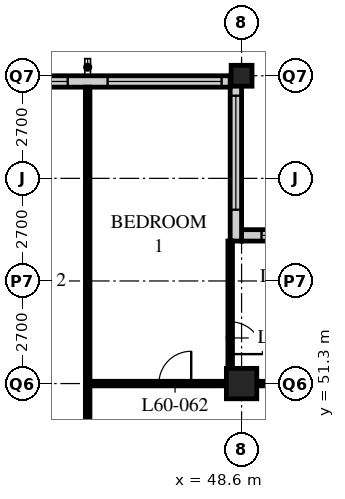
"""IFC4 building model, lengths in metres.
Left out: names, types, materials, properties, quantities, classifications, styles, units other than length and angle.
Written with IfcOpenShell. Run it as: python <this file> out.ifc"""

import sys

from ifc_helpers import new_model, si_unit, direction, frame, frame_2d, origin, origin_2d, place, context, subcontext, project, spatial, rectangle, hollow_rectangle, extrude, element, fill, save


model = new_model("IFC4")
c1 = context("Model", 3, precision=1e-05, world=origin(), true_north=direction((0.0, 1.0)))
c2 = subcontext(c1, "Body", "Model", "MODEL_VIEW")
j1 = project(units=[si_unit("LENGTHUNIT", "METRE"), si_unit("PLANEANGLEUNIT", "RADIAN")], contexts=[c1])
p1 = place(None, origin())
s1 = spatial("IfcSite", under=j1, at=p1, CompositionType="ELEMENT")
p2 = place(p1, origin())
s2 = spatial("IfcBuilding", under=s1, at=p2, CompositionType="ELEMENT")
p3 = place(p2, frame((0.0, 0.0, 231.6)))
s3 = spatial("IfcBuildingStorey", under=s2, at=p3, CompositionType="ELEMENT", Elevation=231.6)
p4 = place(p3, frame((48.6, 51.3, 0.0), z_axis=(0.0, 0.0, 1.0), x_axis=(1.0, 0.0, 0.0)))
e1 = element("IfcColumn", 1, at=p4, inside=s3, PredefinedType="COLUMN", context=c2, shape_type="SweptSolid", body=[
    extrude(hollow_rectangle(XDim=0.8, YDim=0.8, WallThickness=0.08, at=origin_2d()), origin(), (0.0, 0.0, 1.0), 3.6),
])
p5 = place(p3, frame((48.6, 59.4, 0.0), z_axis=(0.0, 0.0, 1.0), x_axis=(1.0, 0.0, 0.0)))
e2 = element("IfcColumn", 2, at=p5, inside=s3, PredefinedType="COLUMN", context=c2, shape_type="SweptSolid", body=[
    extrude(hollow_rectangle(XDim=0.55, YDim=0.55, WallThickness=0.045, at=origin_2d()), origin(), (0.0, 0.0, 1.0), 3.6),
])
p6 = place(p3, frame((52.35, 55.2, 0.0), z_axis=(0.0, 0.0, 1.0), x_axis=(-1.0, 0.0, 0.0)))
e3 = element("IfcWall", 3, at=p6, inside=s3, PredefinedType="SOLIDWALL", context=c2, shape_type="SweptSolid", body=[
    extrude(rectangle(XDim=3.75, YDim=0.3, at=frame_2d((1.875, 0.0))), origin(), (0.0, 0.0, 1.0), 2.65),
])
p7 = place(p6, frame((0.225, 0.0, 0.6)))
e4 = element("IfcOpeningElement", 4, at=p7, cuts=e3, PredefinedType="OPENING", context=c2, shape_type="SweptSolid", body=[
    extrude(rectangle(XDim=3.0, YDim=1.7, at=frame_2d((1.5, 0.85))), frame((0.0, 0.16, 0.0), z_axis=(0.0, -1.0, 0.0), x_axis=(1.0, 0.0, 0.0)), (0.0, 0.0, 1.0), 0.32),
])
p8 = place(p3, frame((48.45, 55.05, 0.0), z_axis=(0.0, 0.0, 1.0), x_axis=(0.0, 1.0, 0.0)))
e5 = element("IfcWall", 5, at=p8, inside=s3, PredefinedType="SOLIDWALL", context=c2, shape_type="SweptSolid", body=[
    extrude(rectangle(XDim=4.35, YDim=0.3, at=frame_2d((2.175, 0.0))), origin(), (0.0, 0.0, 1.0), 2.35),
])
p9 = place(p8, frame((0.825, 0.0, 0.6)))
e6 = element("IfcOpeningElement", 6, at=p9, cuts=e5, PredefinedType="OPENING", context=c2, shape_type="SweptSolid", body=[
    extrude(rectangle(XDim=3.0, YDim=1.7, at=frame_2d((1.5, 0.85))), frame((0.0, 0.16, 0.0), z_axis=(0.0, -1.0, 0.0), x_axis=(1.0, 0.0, 0.0)), (0.0, 0.0, 1.0), 0.32),
])
p10 = place(p3, frame((48.3, 59.25, 0.0), z_axis=(0.0, 0.0, 1.0), x_axis=(-1.0, 0.0, 0.0)))
e7 = element("IfcWall", 7, at=p10, inside=s3, PredefinedType="SOLIDWALL", context=c2, shape_type="SweptSolid", body=[
    extrude(rectangle(XDim=40.2, YDim=0.3, at=frame_2d((20.1, 0.0))), origin(), (0.0, 0.0, 1.0), 2.35),
])
p11 = place(p10, frame((0.225, 0.0, 0.6)))
e8 = element("IfcOpeningElement", 8, at=p11, cuts=e7, PredefinedType="OPENING", context=c2, shape_type="SweptSolid", body=[
    extrude(rectangle(XDim=3.0, YDim=1.7, at=frame_2d((1.5, 0.85))), frame((0.0, 0.16, 0.0), z_axis=(0.0, -1.0, 0.0), x_axis=(1.0, 0.0, 0.0)), (0.0, 0.0, 1.0), 0.32),
])
p12 = place(p10, frame((4.275, 0.0, 0.6)))
e9 = element("IfcOpeningElement", 9, at=p12, cuts=e7, PredefinedType="OPENING", context=c2, shape_type="SweptSolid", body=[
    extrude(rectangle(XDim=3.0, YDim=1.7, at=frame_2d((1.5, 0.85))), frame((0.0, 0.16, 0.0), z_axis=(0.0, -1.0, 0.0), x_axis=(1.0, 0.0, 0.0)), (0.0, 0.0, 1.0), 0.32),
])
p13 = place(p10, frame((8.325, 0.0, 0.6)))
e10 = element("IfcOpeningElement", 10, at=p13, cuts=e7, PredefinedType="OPENING", context=c2, shape_type="SweptSolid", body=[
    extrude(rectangle(XDim=3.0, YDim=1.7, at=frame_2d((1.5, 0.85))), frame((0.0, 0.16, 0.0), z_axis=(0.0, -1.0, 0.0), x_axis=(1.0, 0.0, 0.0)), (0.0, 0.0, 1.0), 0.32),
])
p14 = place(p10, frame((12.375, 0.0, 0.6)))
e11 = element("IfcOpeningElement", 11, at=p14, cuts=e7, PredefinedType="OPENING", context=c2, shape_type="SweptSolid", body=[
    extrude(rectangle(XDim=3.0, YDim=1.7, at=frame_2d((1.5, 0.85))), frame((0.0, 0.16, 0.0), z_axis=(0.0, -1.0, 0.0), x_axis=(1.0, 0.0, 0.0)), (0.0, 0.0, 1.0), 0.32),
])
p15 = place(p10, frame((16.425, 0.0, 0.6)))
e12 = element("IfcOpeningElement", 12, at=p15, cuts=e7, PredefinedType="OPENING", context=c2, shape_type="SweptSolid", body=[
    extrude(rectangle(XDim=3.0, YDim=1.7, at=frame_2d((1.5, 0.85))), frame((0.0, 0.16, 0.0), z_axis=(0.0, -1.0, 0.0), x_axis=(1.0, 0.0, 0.0)), (0.0, 0.0, 1.0), 0.32),
])
p16 = place(p10, frame((20.475, 0.0, 0.6)))
e13 = element("IfcOpeningElement", 13, at=p16, cuts=e7, PredefinedType="OPENING", context=c2, shape_type="SweptSolid", body=[
    extrude(rectangle(XDim=3.0, YDim=1.7, at=frame_2d((1.5, 0.85))), frame((0.0, 0.16, 0.0), z_axis=(0.0, -1.0, 0.0), x_axis=(1.0, 0.0, 0.0)), (0.0, 0.0, 1.0), 0.32),
])
p17 = place(p10, frame((24.525, 0.0, 0.6)))
e14 = element("IfcOpeningElement", 14, at=p17, cuts=e7, PredefinedType="OPENING", context=c2, shape_type="SweptSolid", body=[
    extrude(rectangle(XDim=3.0, YDim=1.7, at=frame_2d((1.5, 0.85))), frame((0.0, 0.16, 0.0), z_axis=(0.0, -1.0, 0.0), x_axis=(1.0, 0.0, 0.0)), (0.0, 0.0, 1.0), 0.32),
])
p18 = place(p10, frame((28.575, 0.0, 0.6)))
e15 = element("IfcOpeningElement", 15, at=p18, cuts=e7, PredefinedType="OPENING", context=c2, shape_type="SweptSolid", body=[
    extrude(rectangle(XDim=3.0, YDim=1.7, at=frame_2d((1.5, 0.85))), frame((0.0, 0.16, 0.0), z_axis=(0.0, -1.0, 0.0), x_axis=(1.0, 0.0, 0.0)), (0.0, 0.0, 1.0), 0.32),
])
p19 = place(p10, frame((32.625, 0.0, 0.6)))
e16 = element("IfcOpeningElement", 16, at=p19, cuts=e7, PredefinedType="OPENING", context=c2, shape_type="SweptSolid", body=[
    extrude(rectangle(XDim=3.0, YDim=1.7, at=frame_2d((1.5, 0.85))), frame((0.0, 0.16, 0.0), z_axis=(0.0, -1.0, 0.0), x_axis=(1.0, 0.0, 0.0)), (0.0, 0.0, 1.0), 0.32),
])
p20 = place(p10, frame((36.675, 0.0, 0.6)))
e17 = element("IfcOpeningElement", 17, at=p20, cuts=e7, PredefinedType="OPENING", context=c2, shape_type="SweptSolid", body=[
    extrude(rectangle(XDim=3.0, YDim=1.7, at=frame_2d((1.5, 0.85))), frame((0.0, 0.16, 0.0), z_axis=(0.0, -1.0, 0.0), x_axis=(1.0, 0.0, 0.0)), (0.0, 0.0, 1.0), 0.32),
])
p21 = place(p3, frame((44.55, 45.6, 0.0), z_axis=(0.0, 0.0, 1.0), x_axis=(0.0, 1.0, 0.0)))
e18 = element("IfcWall", 18, at=p21, inside=s3, PredefinedType="PARTITIONING", context=c2, shape_type="SweptSolid", body=[
    extrude(rectangle(XDim=13.5, YDim=0.12, at=frame_2d((6.75, 0.0))), origin(), (0.0, 0.0, 1.0), 3.35),
])
p22 = place(p3, frame((44.55, 51.3, 0.0), z_axis=(0.0, 0.0, 1.0), x_axis=(1.0, 0.0, 0.0)))
e19 = element("IfcWall", 19, at=p22, inside=s3, PredefinedType="PARTITIONING", context=c2, shape_type="SweptSolid", body=[
    extrude(rectangle(XDim=7.8, YDim=0.12, at=frame_2d((3.9, 0.0))), origin(), (0.0, 0.0, 1.0), 2.588),
])
p23 = place(p22, frame((1.875, 0.0, 0.0)))
e20 = element("IfcOpeningElement", 20, at=p23, cuts=e19, PredefinedType="OPENING", context=c2, shape_type="SweptSolid", body=[
    extrude(rectangle(XDim=0.85, YDim=2.1, at=frame_2d((0.425, 1.05))), frame((0.0, 0.07, 0.0), z_axis=(0.0, -1.0, 0.0), x_axis=(1.0, 0.0, 0.0)), (0.0, 0.0, 1.0), 0.14),
])
p24 = place(p3, frame((48.3, 51.3, 0.0), z_axis=(0.0, 0.0, 1.0), x_axis=(0.0, 1.0, 0.0)))
e21 = element("IfcWall", 21, at=p24, inside=s3, PredefinedType="PARTITIONING", context=c2, shape_type="SweptSolid", body=[
    extrude(rectangle(XDim=3.75, YDim=0.12, at=frame_2d((1.875, 0.0))), origin(), (0.0, 0.0, 1.0), 2.35),
])
p25 = place(p24, frame((0.775, 0.0, 0.0)))
e22 = element("IfcOpeningElement", 22, at=p25, cuts=e21, PredefinedType="OPENING", context=c2, shape_type="SweptSolid", body=[
    extrude(rectangle(XDim=0.85, YDim=2.1, at=frame_2d((0.425, 1.05))), frame((0.0, 0.07, 0.0), z_axis=(0.0, -1.0, 0.0), x_axis=(1.0, 0.0, 0.0)), (0.0, 0.0, 1.0), 0.14),
])
p26 = place(p7, origin())
e23 = element("IfcWindow", 23, at=p26, inside=s3, PartitioningType="SINGLE_PANEL", PredefinedType="WINDOW", context=c2, shape_type="SweptSolid", body=[
    extrude(rectangle(XDim=3.0, YDim=1.7, at=frame_2d((1.5, 0.85))), frame((0.0, 0.03, 0.0), z_axis=(0.0, -1.0, 0.0), x_axis=(1.0, 0.0, 0.0)), (0.0, 0.0, 1.0), 0.06),
])
fill(e4, e23)
p27 = place(p9, origin())
e24 = element("IfcWindow", 24, at=p27, inside=s3, PartitioningType="SINGLE_PANEL", PredefinedType="WINDOW", context=c2, shape_type="SweptSolid", body=[
    extrude(rectangle(XDim=3.0, YDim=1.7, at=frame_2d((1.5, 0.85))), frame((0.0, 0.03, 0.0), z_axis=(0.0, -1.0, 0.0), x_axis=(1.0, 0.0, 0.0)), (0.0, 0.0, 1.0), 0.06),
])
fill(e6, e24)
p28 = place(p11, origin())
e25 = element("IfcWindow", 25, at=p28, inside=s3, PartitioningType="SINGLE_PANEL", PredefinedType="WINDOW", context=c2, shape_type="SweptSolid", body=[
    extrude(rectangle(XDim=3.0, YDim=1.7, at=frame_2d((1.5, 0.85))), frame((0.0, 0.03, 0.0), z_axis=(0.0, -1.0, 0.0), x_axis=(1.0, 0.0, 0.0)), (0.0, 0.0, 1.0), 0.06),
])
fill(e8, e25)
p29 = place(p12, origin())
e26 = element("IfcWindow", 26, at=p29, inside=s3, PartitioningType="SINGLE_PANEL", PredefinedType="WINDOW", context=c2, shape_type="SweptSolid", body=[
    extrude(rectangle(XDim=3.0, YDim=1.7, at=frame_2d((1.5, 0.85))), frame((0.0, 0.03, 0.0), z_axis=(0.0, -1.0, 0.0), x_axis=(1.0, 0.0, 0.0)), (0.0, 0.0, 1.0), 0.06),
])
fill(e9, e26)
p30 = place(p23, origin())
e27 = element("IfcDoor", 27, at=p30, inside=s3, OperationType="SINGLE_SWING_RIGHT", PredefinedType="DOOR", context=c2, shape_type="SweptSolid", body=[
    extrude(rectangle(XDim=0.85, YDim=2.1, at=frame_2d((0.425, 1.05))), frame((0.0, 0.025, 0.0), z_axis=(0.0, -1.0, 0.0), x_axis=(1.0, 0.0, 0.0)), (0.0, 0.0, 1.0), 0.05),
])
fill(e20, e27)
p31 = place(p25, origin())
e28 = element("IfcDoor", 28, at=p31, inside=s3, OperationType="SINGLE_SWING_RIGHT", PredefinedType="DOOR", context=c2, shape_type="SweptSolid", body=[
    extrude(rectangle(XDim=0.85, YDim=2.1, at=frame_2d((0.425, 1.05))), frame((0.0, 0.025, 0.0), z_axis=(0.0, -1.0, 0.0), x_axis=(1.0, 0.0, 0.0)), (0.0, 0.0, 1.0), 0.05),
])
fill(e22, e28)
save(model, sys.argv[1])
